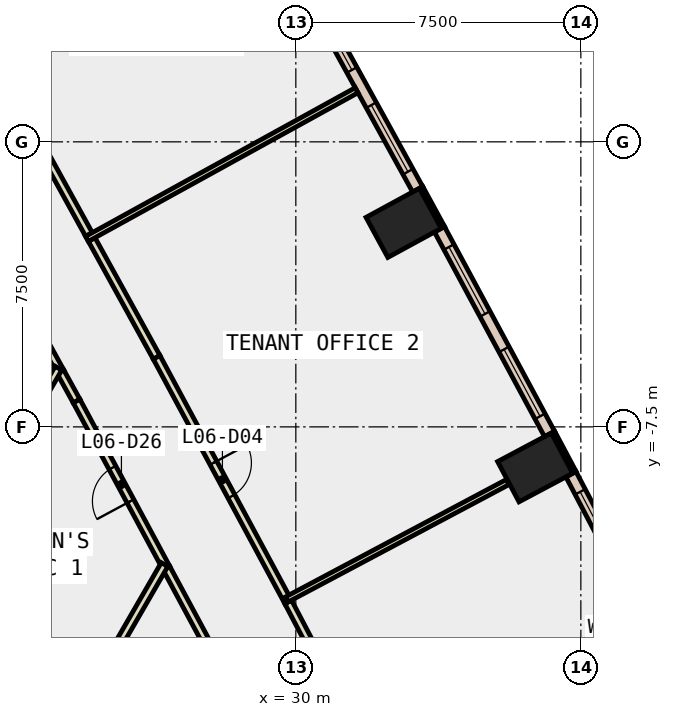
"""IFC4 building model, lengths in metres.
Left out: names, types, materials, properties, quantities, classifications, styles, units other than length and angle.
Written with IfcOpenShell. Run it as: python <this file> out.ifc"""

import sys

from ifc_helpers import new_model, si_unit, direction, frame, frame_2d, origin, origin_2d, place, context, subcontext, project, spatial, rectangle, extrude, element, fill, save


model = new_model("IFC4")
c1 = context("Model", 3, precision=1e-05, world=origin(), true_north=direction((0.0, 1.0)))
c2 = subcontext(c1, "Body", "Model", "MODEL_VIEW")
j1 = project(units=[si_unit("LENGTHUNIT", "METRE"), si_unit("PLANEANGLEUNIT", "RADIAN")], contexts=[c1])
p1 = place(None, origin())
s1 = spatial("IfcSite", under=j1, at=p1, CompositionType="ELEMENT")
p2 = place(p1, origin())
s2 = spatial("IfcBuilding", under=s1, at=p2, CompositionType="ELEMENT")
p3 = place(p2, frame((0.0, 0.0, 35.0)))
s3 = spatial("IfcBuildingStorey", under=s2, at=p3, CompositionType="ELEMENT", Elevation=35.0)
for number, where, z_axis, x_axis in (
    (1, (36.298, -8.567, -0.6), (0.0, 0.0, 1.0), (-0.469, 0.883, 0.0)),
    (2, (32.837, -2.132, -0.6), (0.0, 0.0, 1.0), (-0.478, 0.878, 0.0)),
):
    element("IfcColumn", number, at=place(p3, frame(where, z_axis=z_axis, x_axis=x_axis)), inside=s3, PredefinedType="COLUMN", context=c2, shape_type="SweptSolid", body=[
        extrude(rectangle(XDim=1.2, YDim=1.6, at=origin_2d()), origin(), (0.0, 0.0, 1.0), 4.4),
    ])
p4 = place(p3, frame((37.33, -8.698, 0.0), z_axis=(0.0, 0.0, 1.0), x_axis=(-0.469383408131, 0.882994459876, 0.0)))
e3 = element("IfcWall", 3, at=p4, inside=s3, PredefinedType="STANDARD", context=c2, shape_type="SweptSolid", body=[
    extrude(rectangle(XDim=1.199, YDim=0.1, at=frame_2d((0.6, 0.0))), origin(), (0.0, 0.0, 1.0), 3.8),
])
p5 = place(p3, frame((33.87, -2.253, 0.0), z_axis=(0.0, 0.0, 1.0), x_axis=(-0.478424520456, 0.878128679765, 0.0)))
e4 = element("IfcWall", 4, at=p5, inside=s3, PredefinedType="STANDARD", context=c2, shape_type="SweptSolid", body=[
    extrude(rectangle(XDim=1.2, YDim=0.1, at=frame_2d((0.6, 0.0))), origin(), (0.0, 0.0, 1.0), 3.8),
])
p6 = place(p3, frame((40.072, -14.141, 0.0), z_axis=(0.0, 0.0, 1.0), x_axis=(-0.464913987781, 0.885355851602, 0.0)))
e5 = element("IfcWall", 5, at=p6, inside=s3, PredefinedType="STANDARD", context=c2, shape_type="SweptSolid", body=[
    extrude(rectangle(XDim=6.094, YDim=0.3, at=frame_2d((3.047, 0.0))), origin(), (0.0, 0.0, 1.0), 3.8),
])
p7 = place(p6, frame((0.523, 0.0, 0.9)))
e6 = element("IfcOpeningElement", 6, at=p7, cuts=e5, PredefinedType="OPENING", context=c2, shape_type="SweptSolid", body=[
    extrude(rectangle(XDim=2.0, YDim=2.6, at=frame_2d((1.0, 1.3))), frame((0.0, 0.16, 0.0), z_axis=(0.0, -1.0, 0.0), x_axis=(1.0, 0.0, 0.0)), (0.0, 0.0, 1.0), 0.32),
])
p8 = place(p6, frame((3.57, 0.0, 0.9)))
e7 = element("IfcOpeningElement", 7, at=p8, cuts=e5, PredefinedType="OPENING", context=c2, shape_type="SweptSolid", body=[
    extrude(rectangle(XDim=2.0, YDim=2.6, at=frame_2d((1.0, 1.3))), frame((0.0, 0.16, 0.0), z_axis=(0.0, -1.0, 0.0), x_axis=(1.0, 0.0, 0.0)), (0.0, 0.0, 1.0), 0.32),
])
p9 = place(p3, frame((36.677, -7.688, 0.0), z_axis=(0.0, 0.0, 1.0), x_axis=(-0.47375467653, 0.880656860795, 0.0)))
e8 = element("IfcWall", 8, at=p9, inside=s3, PredefinedType="STANDARD", context=c2, shape_type="SweptSolid", body=[
    extrude(rectangle(XDim=6.117, YDim=0.3, at=frame_2d((3.059, 0.0))), origin(), (0.0, 0.0, 1.0), 3.8),
])
p10 = place(p9, frame((0.529, 0.0, 0.9)))
e9 = element("IfcOpeningElement", 9, at=p10, cuts=e8, PredefinedType="OPENING", context=c2, shape_type="SweptSolid", body=[
    extrude(rectangle(XDim=2.0, YDim=2.6, at=frame_2d((1.0, 1.3))), frame((0.0, 0.16, 0.0), z_axis=(0.0, -1.0, 0.0), x_axis=(1.0, 0.0, 0.0)), (0.0, 0.0, 1.0), 0.32),
])
p11 = place(p9, frame((3.588, 0.0, 0.9)))
e10 = element("IfcOpeningElement", 10, at=p11, cuts=e8, PredefinedType="OPENING", context=c2, shape_type="SweptSolid", body=[
    extrude(rectangle(XDim=2.0, YDim=2.6, at=frame_2d((1.0, 1.3))), frame((0.0, 0.16, 0.0), z_axis=(0.0, -1.0, 0.0), x_axis=(1.0, 0.0, 0.0)), (0.0, 0.0, 1.0), 0.32),
])
p12 = place(p3, frame((33.206, -1.249, 0.0), z_axis=(0.0, 0.0, 1.0), x_axis=(-0.482596003603, 0.875843078015, 0.0)))
e11 = element("IfcWall", 11, at=p12, inside=s3, PredefinedType="STANDARD", context=c2, shape_type="SweptSolid", body=[
    extrude(rectangle(XDim=6.115, YDim=0.3, at=frame_2d((3.058, 0.0))), origin(), (0.0, 0.0, 1.0), 3.8),
])
p13 = place(p12, frame((0.529, 0.0, 0.9)))
e12 = element("IfcOpeningElement", 12, at=p13, cuts=e11, PredefinedType="OPENING", context=c2, shape_type="SweptSolid", body=[
    extrude(rectangle(XDim=2.0, YDim=2.6, at=frame_2d((1.0, 1.3))), frame((0.0, 0.16, 0.0), z_axis=(0.0, -1.0, 0.0), x_axis=(1.0, 0.0, 0.0)), (0.0, 0.0, 1.0), 0.32),
])
p14 = place(p12, frame((3.586, 0.0, 0.9)))
e13 = element("IfcOpeningElement", 13, at=p14, cuts=e11, PredefinedType="OPENING", context=c2, shape_type="SweptSolid", body=[
    extrude(rectangle(XDim=2.0, YDim=2.6, at=frame_2d((1.0, 1.3))), frame((0.0, 0.16, 0.0), z_axis=(0.0, -1.0, 0.0), x_axis=(1.0, 0.0, 0.0)), (0.0, 0.0, 1.0), 0.32),
])
p15 = place(p3, frame((23.803, -6.044, 0.0), z_axis=(0.0, 0.0, 1.0), x_axis=(-0.482588436287, 0.875847247619, 0.0)))
e14 = element("IfcWall", 14, at=p15, inside=s3, PredefinedType="PARTITIONING", context=c2, shape_type="SweptSolid", body=[
    extrude(rectangle(XDim=6.324, YDim=0.2, at=frame_2d((3.162, 0.0))), origin(), (0.0, 0.0, 1.0), 3.8),
])
p16 = place(p15, frame((2.662, 0.0, 0.0)))
e15 = element("IfcOpeningElement", 15, at=p16, cuts=e14, PredefinedType="OPENING", context=c2, shape_type="SweptSolid", body=[
    extrude(rectangle(XDim=1.0, YDim=2.1, at=frame_2d((0.5, 1.05))), frame((0.0, 0.11, 0.0), z_axis=(0.0, -1.0, 0.0), x_axis=(1.0, 0.0, 0.0)), (0.0, 0.0, 1.0), 0.22),
])
p17 = place(p3, frame((26.592, -11.211, 0.0), z_axis=(0.0, 0.0, 1.0), x_axis=(-0.473737860011, 0.880665907136, 0.0)))
e16 = element("IfcWall", 16, at=p17, inside=s3, PredefinedType="PARTITIONING", context=c2, shape_type="SweptSolid", body=[
    extrude(rectangle(XDim=4.988, YDim=0.2, at=frame_2d((2.494, 0.0))), origin(), (0.0, 0.0, 1.0), 3.8),
])
p18 = place(p17, frame((1.994, 0.0, 0.0)))
e17 = element("IfcOpeningElement", 17, at=p18, cuts=e16, PredefinedType="OPENING", context=c2, shape_type="SweptSolid", body=[
    extrude(rectangle(XDim=1.0, YDim=2.1, at=frame_2d((0.5, 1.05))), frame((0.0, 0.11, 0.0), z_axis=(0.0, -1.0, 0.0), x_axis=(1.0, 0.0, 0.0)), (0.0, 0.0, 1.0), 0.22),
])
p19 = place(p3, frame((24.229, -6.818, 0.0), z_axis=(0.0, 0.0, 1.0), x_axis=(-0.482120251302, 0.876105052653, 0.0)))
e18 = element("IfcWall", 18, at=p19, inside=s3, PredefinedType="PARTITIONING", context=c2, shape_type="SweptSolid", body=[
    extrude(rectangle(XDim=0.884, YDim=0.2, at=frame_2d((0.442, 0.0))), origin(), (0.0, 0.0, 1.0), 3.8),
])
p20 = place(p3, frame((27.644, -13.167, 0.0), z_axis=(0.0, 0.0, 1.0), x_axis=(-0.473660574093, 0.880707477287, 0.0)))
e19 = element("IfcWall", 19, at=p20, inside=s3, PredefinedType="PARTITIONING", context=c2, shape_type="SweptSolid", body=[
    extrude(rectangle(XDim=2.221, YDim=0.2, at=frame_2d((1.11, 0.0))), origin(), (0.0, 0.0, 1.0), 3.8),
])
p21 = place(p3, frame((29.799, -12.107, 0.0), z_axis=(0.0, 0.0, 1.0), x_axis=(0.464767882002, -0.885432558617, 0.0)))
e20 = element("IfcWall", 20, at=p21, inside=s3, PredefinedType="PARTITIONING", context=c2, shape_type="SweptSolid", body=[
    extrude(rectangle(XDim=6.233, YDim=0.2, at=frame_2d((3.117, 0.0))), origin(), (0.0, 0.0, 1.0), 3.8),
])
p22 = place(p21, frame((2.58, 0.0, 0.0)))
e21 = element("IfcOpeningElement", 21, at=p22, cuts=e20, PredefinedType="OPENING", context=c2, shape_type="SweptSolid", body=[
    extrude(rectangle(XDim=1.0, YDim=2.1, at=frame_2d((0.5, 1.05))), frame((0.0, 0.11, 0.0), z_axis=(0.0, -1.0, 0.0), x_axis=(1.0, 0.0, 0.0)), (0.0, 0.0, 1.0), 0.22),
])
p23 = place(p3, frame((24.628, -2.569, 0.0), z_axis=(0.0, 0.0, 1.0), x_axis=(0.482566980384, -0.875859069396, 0.0)))
e22 = element("IfcWall", 22, at=p23, inside=s3, PredefinedType="PARTITIONING", context=c2, shape_type="SweptSolid", body=[
    extrude(rectangle(XDim=3.542, YDim=0.2, at=frame_2d((1.771, 0.0))), origin(), (0.0, 0.0, 1.0), 3.8),
])
p24 = place(p3, frame((26.337, -5.671, 0.0), z_axis=(0.0, 0.0, 1.0), x_axis=(0.473794961698, -0.880635187958, 0.0)))
e23 = element("IfcWall", 23, at=p24, inside=s3, PredefinedType="PARTITIONING", context=c2, shape_type="SweptSolid", body=[
    extrude(rectangle(XDim=7.307, YDim=0.2, at=frame_2d((3.654, 0.0))), origin(), (0.0, 0.0, 1.0), 3.8),
])
p25 = place(p24, frame((3.154, 0.0, 0.0)))
e24 = element("IfcOpeningElement", 24, at=p25, cuts=e23, PredefinedType="OPENING", context=c2, shape_type="SweptSolid", body=[
    extrude(rectangle(XDim=1.0, YDim=2.1, at=frame_2d((0.5, 1.05))), frame((0.0, 0.11, 0.0), z_axis=(0.0, -1.0, 0.0), x_axis=(1.0, 0.0, 0.0)), (0.0, 0.0, 1.0), 0.22),
])
p26 = place(p3, frame((22.847, 0.664, 0.0), z_axis=(0.0, 0.0, 1.0), x_axis=(0.482537844436, -0.875875121628, 0.0)))
e25 = element("IfcWall", 25, at=p26, inside=s3, PredefinedType="PARTITIONING", context=c2, shape_type="SweptSolid", body=[
    extrude(rectangle(XDim=3.542, YDim=0.2, at=frame_2d((1.771, 0.0))), origin(), (0.0, 0.0, 1.0), 3.8),
])
p27 = place(p3, frame((23.754, -5.956, 0.0), z_axis=(0.0, 0.0, 1.0), x_axis=(-0.500093796661, -0.865971243484, 0.0)))
e26 = element("IfcWall", 26, at=p27, inside=s3, PredefinedType="PARTITIONING", context=c2, shape_type="SweptSolid", body=[
    extrude(rectangle(XDim=1.594, YDim=0.2, at=frame_2d((0.797, 0.0))), origin(), (0.0, 0.0, 1.0), 3.8),
])
p28 = place(p3, frame((20.482, -11.824, 0.0), z_axis=(0.0, 0.0, 1.0), x_axis=(0.866022959057, -0.500004234368, 0.0)))
e27 = element("IfcWall", 27, at=p28, inside=s3, PredefinedType="PARTITIONING", context=c2, shape_type="SweptSolid", body=[
    extrude(rectangle(XDim=5.0, YDim=0.2, at=frame_2d((2.5, 0.0))), origin(), (0.0, 0.0, 1.0), 3.8),
])
p29 = place(p3, frame((26.545, -11.123, 0.0), z_axis=(0.0, 0.0, 1.0), x_axis=(-0.500100605862, -0.865967311171, 0.0)))
e28 = element("IfcWall", 28, at=p29, inside=s3, PredefinedType="PARTITIONING", context=c2, shape_type="SweptSolid", body=[
    extrude(rectangle(XDim=3.539, YDim=0.2, at=frame_2d((1.77, 0.0))), origin(), (0.0, 0.0, 1.0), 3.8),
])
p30 = place(p3, frame((29.764, -12.04, 0.0), z_axis=(0.0, 0.0, 1.0), x_axis=(0.883018657393, 0.469337885426, 0.0)))
e29 = element("IfcWall", 29, at=p30, inside=s3, PredefinedType="PARTITIONING", context=c2, shape_type="SweptSolid", body=[
    extrude(rectangle(XDim=6.58, YDim=0.15, at=frame_2d((3.29, 0.0))), origin(), (0.0, 0.0, 1.0), 3.8),
])
p31 = place(p3, frame((24.505, -2.552, 0.0), z_axis=(0.0, 0.0, 1.0), x_axis=(0.875845276652, 0.482592013369, 0.0)))
e30 = element("IfcWall", 30, at=p31, inside=s3, PredefinedType="PARTITIONING", context=c2, shape_type="SweptSolid", body=[
    extrude(rectangle(XDim=8.1, YDim=0.15, at=frame_2d((4.05, 0.0))), origin(), (0.0, 0.0, 1.0), 3.8),
])
p32 = place(p8, origin())
e31 = element("IfcWindow", 31, at=p32, inside=s3, PartitioningType="SINGLE_PANEL", PredefinedType="WINDOW", context=c2, shape_type="SweptSolid", body=[
    extrude(rectangle(XDim=2.0, YDim=2.6, at=frame_2d((1.0, 1.3))), frame((0.0, 0.03, 0.0), z_axis=(0.0, -1.0, 0.0), x_axis=(1.0, 0.0, 0.0)), (0.0, 0.0, 1.0), 0.06),
])
fill(e7, e31)
p33 = place(p10, origin())
e32 = element("IfcWindow", 32, at=p33, inside=s3, PartitioningType="SINGLE_PANEL", PredefinedType="WINDOW", context=c2, shape_type="SweptSolid", body=[
    extrude(rectangle(XDim=2.0, YDim=2.6, at=frame_2d((1.0, 1.3))), frame((0.0, 0.03, 0.0), z_axis=(0.0, -1.0, 0.0), x_axis=(1.0, 0.0, 0.0)), (0.0, 0.0, 1.0), 0.06),
])
fill(e9, e32)
p34 = place(p11, origin())
e33 = element("IfcWindow", 33, at=p34, inside=s3, PartitioningType="SINGLE_PANEL", PredefinedType="WINDOW", context=c2, shape_type="SweptSolid", body=[
    extrude(rectangle(XDim=2.0, YDim=2.6, at=frame_2d((1.0, 1.3))), frame((0.0, 0.03, 0.0), z_axis=(0.0, -1.0, 0.0), x_axis=(1.0, 0.0, 0.0)), (0.0, 0.0, 1.0), 0.06),
])
fill(e10, e33)
p35 = place(p13, origin())
e34 = element("IfcWindow", 34, at=p35, inside=s3, PartitioningType="SINGLE_PANEL", PredefinedType="WINDOW", context=c2, shape_type="SweptSolid", body=[
    extrude(rectangle(XDim=2.0, YDim=2.6, at=frame_2d((1.0, 1.3))), frame((0.0, 0.03, 0.0), z_axis=(0.0, -1.0, 0.0), x_axis=(1.0, 0.0, 0.0)), (0.0, 0.0, 1.0), 0.06),
])
fill(e12, e34)
p36 = place(p14, origin())
e35 = element("IfcWindow", 35, at=p36, inside=s3, PartitioningType="SINGLE_PANEL", PredefinedType="WINDOW", context=c2, shape_type="SweptSolid", body=[
    extrude(rectangle(XDim=2.0, YDim=2.6, at=frame_2d((1.0, 1.3))), frame((0.0, 0.03, 0.0), z_axis=(0.0, -1.0, 0.0), x_axis=(1.0, 0.0, 0.0)), (0.0, 0.0, 1.0), 0.06),
])
fill(e13, e35)
p37 = place(p25, origin())
e36 = element("IfcDoor", 36, at=p37, inside=s3, OperationType="SINGLE_SWING_LEFT", PredefinedType="DOOR", context=c2, shape_type="SweptSolid", body=[
    extrude(rectangle(XDim=1.0, YDim=2.1, at=frame_2d((0.5, 1.05))), frame((0.0, 0.025, 0.0), z_axis=(0.0, -1.0, 0.0), x_axis=(1.0, 0.0, 0.0)), (0.0, 0.0, 1.0), 0.05),
])
fill(e24, e36)
p38 = place(p18, origin())
e37 = element("IfcDoor", 37, at=p38, inside=s3, OperationType="SINGLE_SWING_LEFT", PredefinedType="DOOR", context=c2, shape_type="SweptSolid", body=[
    extrude(rectangle(XDim=1.0, YDim=2.1, at=frame_2d((0.5, 1.05))), frame((0.0, 0.025, 0.0), z_axis=(0.0, -1.0, 0.0), x_axis=(1.0, 0.0, 0.0)), (0.0, 0.0, 1.0), 0.05),
])
fill(e17, e37)
save(model, sys.argv[1])
